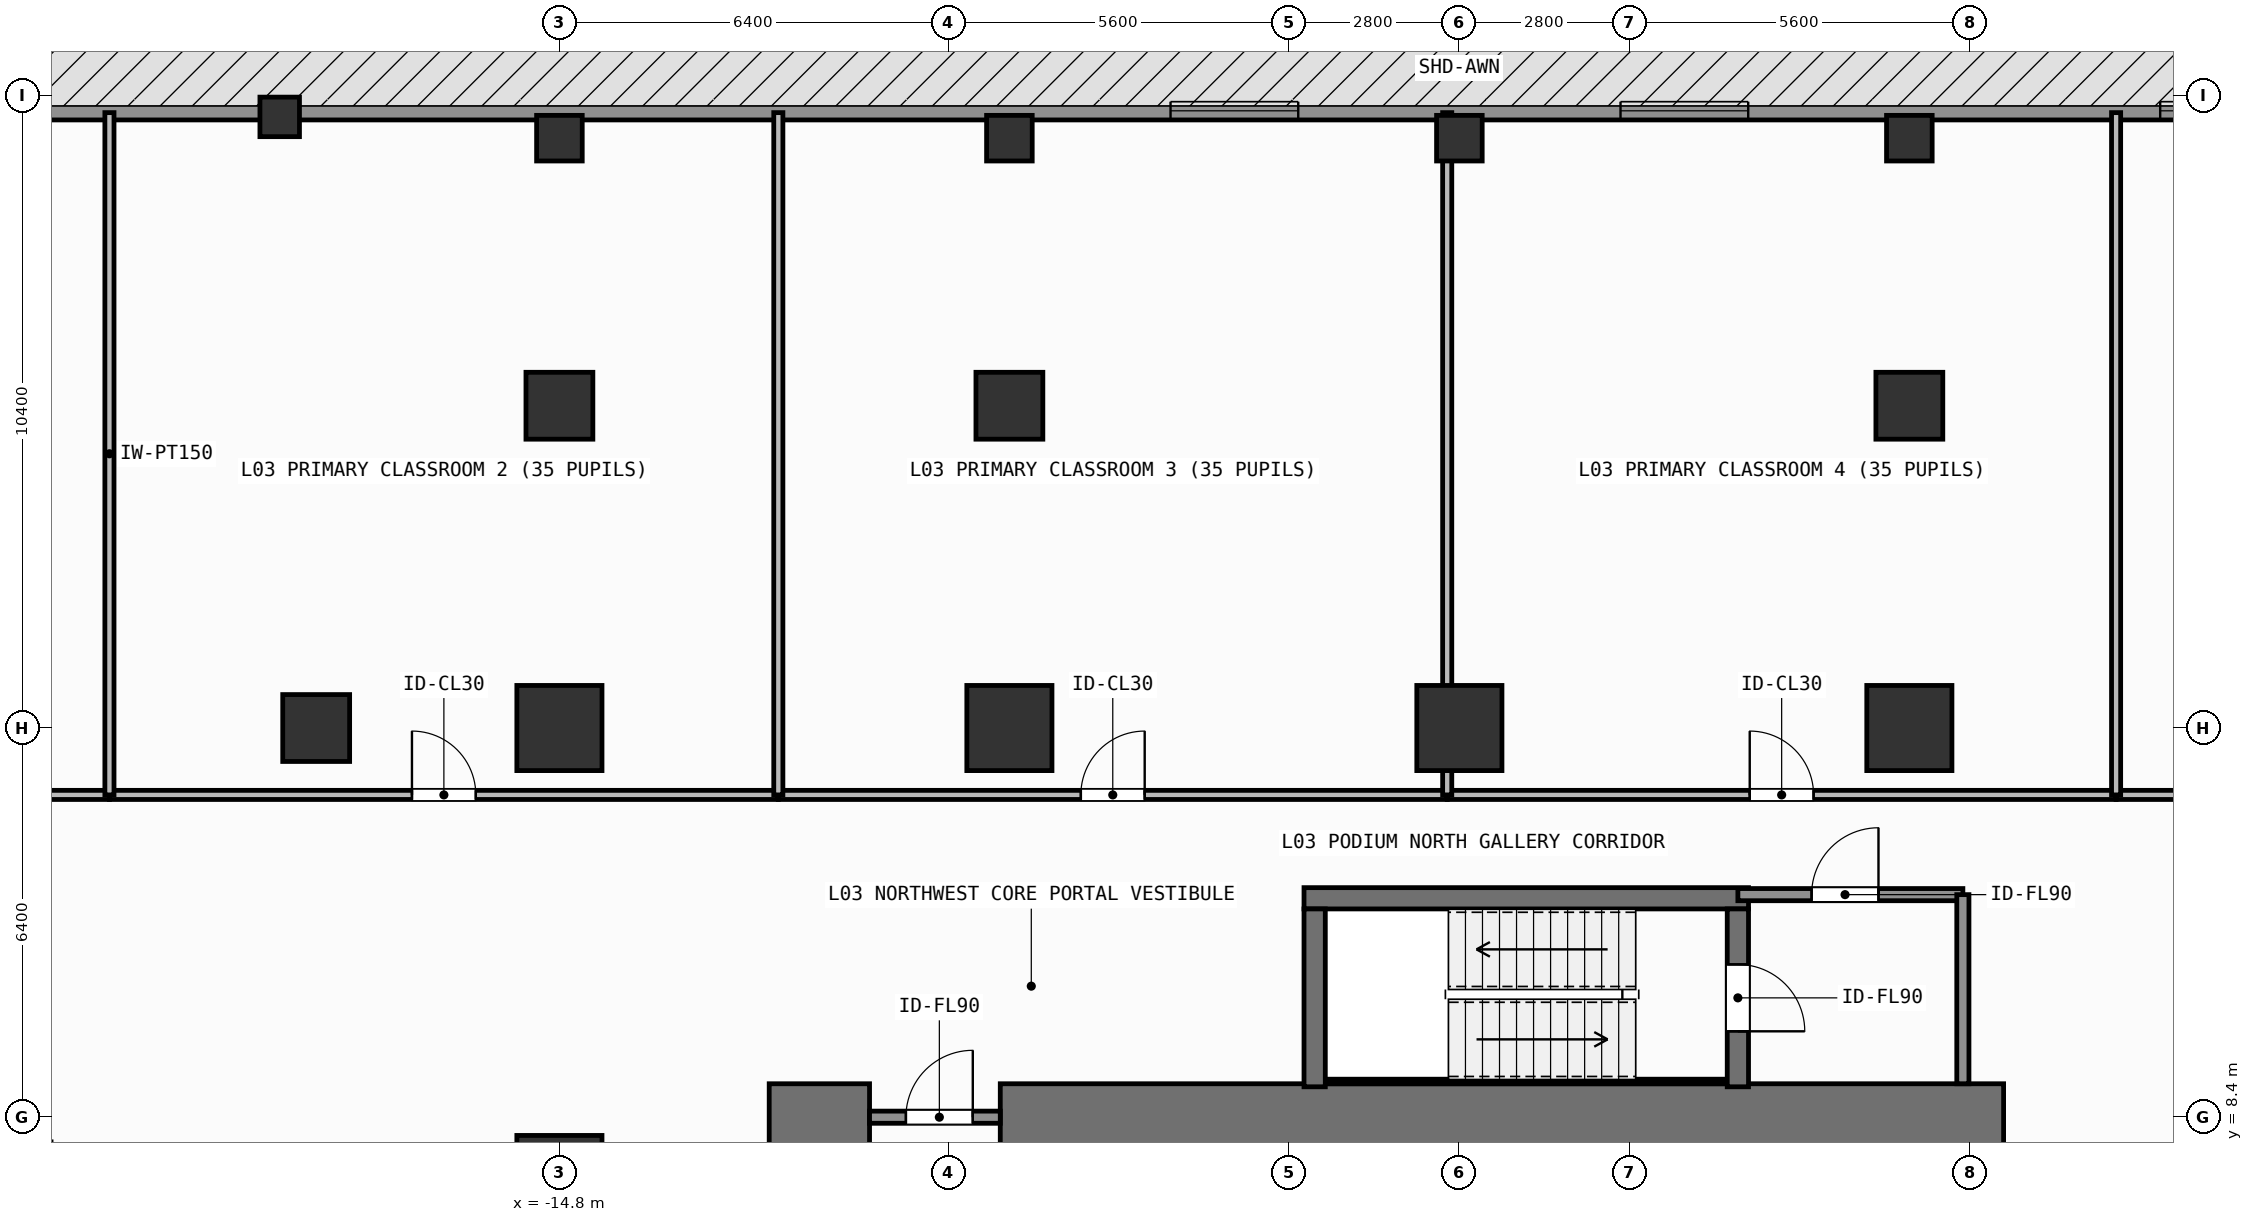
"""IFC4 building model, lengths in metres.
Left out: names, types, materials, properties, quantities, classifications, styles, units other than length and angle.
Written with IfcOpenShell. Run it as: python <this file> out.ifc"""

import sys

from ifc_helpers import new_model, si_unit, direction, frame, frame_2d, origin, origin_2d, place, context, subcontext, project, spatial, rectangle, extrude, element, fill, save


model = new_model("IFC4")
c1 = context("Model", 3, precision=1e-05, world=origin(), true_north=direction((0.0, 1.0)))
c2 = subcontext(c1, "Body", "Model", "MODEL_VIEW")
j1 = project(units=[si_unit("LENGTHUNIT", "METRE"), si_unit("PLANEANGLEUNIT", "RADIAN")], contexts=[c1])
p1 = place(None, origin())
s1 = spatial("IfcSite", under=j1, at=p1, CompositionType="ELEMENT")
p2 = place(p1, origin())
s2 = spatial("IfcBuilding", under=s1, at=p2, CompositionType="ELEMENT")
p3 = place(p2, frame((0.0, 0.0, 9.0)))
s3 = spatial("IfcBuildingStorey", under=s2, at=p3, CompositionType="ELEMENT", Elevation=9.0)
p4 = place(p3, frame((-11.35, 8.4, 0.0), z_axis=(0.0, 0.0, 1.0), x_axis=(1.0, 0.0, 0.0)))
e1 = element("IfcWall", 1, at=p4, inside=s3, PredefinedType="SHEAR", context=c2, shape_type="SweptSolid", body=[
    extrude(rectangle(XDim=1.65, YDim=1.1, at=frame_2d((0.825, 0.0))), origin(), (0.0, 0.0, 1.0), 4.2),
])
p5 = place(p3, frame((-7.55, 8.4, 0.0), z_axis=(0.0, 0.0, 1.0), x_axis=(1.0, 0.0, 0.0)))
e2 = element("IfcWall", 2, at=p5, inside=s3, PredefinedType="SHEAR", context=c2, shape_type="SweptSolid", body=[
    extrude(rectangle(XDim=16.5, YDim=1.1, at=frame_2d((8.25, 0.0))), origin(), (0.0, 0.0, 1.0), 4.2),
])
p6 = place(p3, frame((-2.555, 12.0, 0.0), z_axis=(0.0, 0.0, 1.0), x_axis=(1.0, 0.0, 0.0)))
e3 = element("IfcWall", 3, at=p6, inside=s3, PredefinedType="SHEAR", context=c2, shape_type="SweptSolid", body=[
    extrude(rectangle(XDim=7.31, YDim=0.35, at=frame_2d((3.655, 0.0))), origin(), (0.0, 0.0, 1.0), 4.2),
])
p7 = place(p3, frame((-2.2, 8.988, 0.0), z_axis=(0.0, 0.0, 1.0), x_axis=(1.0, 0.0, 0.0)))
e4 = element("IfcWall", 4, at=p7, inside=s3, PredefinedType="SHEAR", context=c2, shape_type="SweptSolid", body=[
    extrude(rectangle(XDim=6.6, YDim=0.075, at=frame_2d((3.3, 0.0))), origin(), (0.0, 0.0, 1.0), 4.2),
])
p8 = place(p3, frame((-2.38, 8.9, 0.0), z_axis=(0.0, 0.0, 1.0), x_axis=(0.0, 1.0, 0.0)))
e5 = element("IfcWall", 5, at=p8, inside=s3, PredefinedType="SHEAR", context=c2, shape_type="SweptSolid", body=[
    extrude(rectangle(XDim=2.925, YDim=0.35, at=frame_2d((1.462, 0.0))), origin(), (0.0, 0.0, 1.0), 4.2),
])
p9 = place(p3, frame((4.58, 11.825, 0.0), z_axis=(0.0, 0.0, 1.0), x_axis=(0.0, -1.0, 0.0)))
e6 = element("IfcWall", 6, at=p9, inside=s3, PredefinedType="SHEAR", context=c2, shape_type="SweptSolid", body=[
    extrude(rectangle(XDim=2.925, YDim=0.35, at=frame_2d((1.462, 0.0))), origin(), (0.0, 0.0, 1.0), 4.2),
])
p10 = place(p9, frame((0.913, 0.0, 0.0)))
e7 = element("IfcOpeningElement", 7, at=p10, cuts=e6, PredefinedType="OPENING", context=c2, shape_type="SweptSolid", body=[
    extrude(rectangle(XDim=1.1, YDim=2.15, at=frame_2d((0.55, 1.075))), frame((0.0, 0.185, 0.0), z_axis=(0.0, -1.0, 0.0), x_axis=(1.0, 0.0, 0.0)), (0.0, 0.0, 1.0), 0.37),
])
for number, where, z_axis, x_axis in (
    (8, (-14.8, 14.8, 0.0), (0.0, 0.0, 1.0), (1.0, 0.0, 0.0)),
    (9, (-7.4, 14.8, 0.0), (0.0, 0.0, 1.0), (1.0, 0.0, 0.0)),
    (10, (0.0, 14.8, 0.0), (0.0, 0.0, 1.0), (1.0, 0.0, 0.0)),
    (11, (7.4, 14.8, 0.0), (0.0, 0.0, 1.0), (1.0, 0.0, 0.0)),
    (12, (-14.8, 7.4, 0.0), (0.0, 0.0, 1.0), (1.0, 0.0, 0.0)),
):
    element("IfcColumn", number, at=place(p3, frame(where, z_axis=z_axis, x_axis=x_axis)), inside=s3, PredefinedType="COLUMN", context=c2, shape_type="SweptSolid", body=[
        extrude(rectangle(XDim=1.4, YDim=1.4, at=origin_2d()), origin(), (0.0, 0.0, 1.0), 4.2),
    ])
for number, where, z_axis, x_axis in (
    (13, (-18.8, 14.8, 0.0), (0.0, 0.0, 1.0), (1.0, 0.0, 0.0)),
    (14, (-14.8, 20.1, 0.0), (0.0, 0.0, 1.0), (1.0, 0.0, 0.0)),
    (15, (-7.4, 20.1, 0.0), (0.0, 0.0, 1.0), (1.0, 0.0, 0.0)),
    (16, (7.4, 20.1, 0.0), (0.0, 0.0, 1.0), (1.0, 0.0, 0.0)),
):
    element("IfcColumn", number, at=place(p3, frame(where, z_axis=z_axis, x_axis=x_axis)), inside=s3, PredefinedType="COLUMN", context=c2, shape_type="SweptSolid", body=[
        extrude(rectangle(XDim=1.1, YDim=1.1, at=origin_2d()), origin(), (0.0, 0.0, 1.0), 4.2),
    ])
for number, where, z_axis, x_axis in (
    (17, (-14.8, 24.5, 0.0), (0.0, 0.0, 1.0), (1.0, 0.0, 0.0)),
    (18, (-7.4, 24.5, 0.0), (0.0, 0.0, 1.0), (1.0, 0.0, 0.0)),
    (19, (0.0, 24.5, 0.0), (0.0, 0.0, 1.0), (1.0, 0.0, 0.0)),
    (20, (7.4, 24.5, 0.0), (0.0, 0.0, 1.0), (1.0, 0.0, 0.0)),
):
    element("IfcColumn", number, at=place(p3, frame(where, z_axis=z_axis, x_axis=x_axis)), inside=s3, PredefinedType="COLUMN", context=c2, shape_type="SweptSolid", body=[
        extrude(rectangle(XDim=0.75, YDim=0.75, at=origin_2d()), origin(), (0.0, 0.0, 1.0), 4.2),
    ])
p11 = place(p3, frame((-19.4, 24.85, 0.0), z_axis=(0.0, 0.0, 1.0), x_axis=(1.0, 0.0, 0.0)))
e21 = element("IfcColumn", 21, at=p11, inside=s3, PredefinedType="PILASTER", context=c2, shape_type="SweptSolid", body=[
    extrude(rectangle(XDim=0.65, YDim=0.65, at=origin_2d()), origin(), (0.0, 0.0, 1.0), 4.2),
])
p12 = place(p3, frame((-29.1, 24.95, 0.0), z_axis=(0.0, 0.0, 1.0), x_axis=(1.0, 0.0, 0.0)))
e22 = element("IfcWall", 22, at=p12, inside=s3, PredefinedType="SOLIDWALL", context=c2, shape_type="SweptSolid", body=[
    extrude(rectangle(XDim=58.2, YDim=0.3, at=frame_2d((29.1, 0.0))), origin(), (0.0, 0.0, 1.0), 3.96),
])
p13 = place(p12, frame((24.35, 0.0, 0.85)))
e23 = element("IfcOpeningElement", 23, at=p13, cuts=e22, PredefinedType="OPENING", context=c2, shape_type="SweptSolid", body=[
    extrude(rectangle(XDim=2.1, YDim=2.2, at=frame_2d((1.05, 1.1))), frame((0.0, 0.16, 0.0), z_axis=(0.0, -1.0, 0.0), x_axis=(1.0, 0.0, 0.0)), (0.0, 0.0, 1.0), 0.32),
])
p14 = place(p12, frame((31.75, 0.0, 0.85)))
e24 = element("IfcOpeningElement", 24, at=p14, cuts=e22, PredefinedType="OPENING", context=c2, shape_type="SweptSolid", body=[
    extrude(rectangle(XDim=2.1, YDim=2.2, at=frame_2d((1.05, 1.1))), frame((0.0, 0.16, 0.0), z_axis=(0.0, -1.0, 0.0), x_axis=(1.0, 0.0, 0.0)), (0.0, 0.0, 1.0), 0.32),
])
p15 = place(p12, frame((40.625, 0.0, 0.85)))
e25 = element("IfcOpeningElement", 25, at=p15, cuts=e22, PredefinedType="OPENING", context=c2, shape_type="SweptSolid", body=[
    extrude(rectangle(XDim=2.1, YDim=2.2, at=frame_2d((1.05, 1.1))), frame((0.0, 0.16, 0.0), z_axis=(0.0, -1.0, 0.0), x_axis=(1.0, 0.0, 0.0)), (0.0, 0.0, 1.0), 0.32),
])
p16 = place(p12, frame((45.175, 0.0, 0.85)))
e26 = element("IfcOpeningElement", 26, at=p16, cuts=e22, PredefinedType="OPENING", context=c2, shape_type="SweptSolid", body=[
    extrude(rectangle(XDim=2.1, YDim=2.2, at=frame_2d((1.05, 1.1))), frame((0.0, 0.16, 0.0), z_axis=(0.0, -1.0, 0.0), x_axis=(1.0, 0.0, 0.0)), (0.0, 0.0, 1.0), 0.32),
])
p17 = place(p3, frame((4.58, 12.06, 0.0), z_axis=(0.0, 0.0, 1.0), x_axis=(1.0, 0.0, 0.0)))
e27 = element("IfcWall", 27, at=p17, inside=s3, PredefinedType="SOLIDWALL", context=c2, shape_type="SweptSolid", body=[
    extrude(rectangle(XDim=3.7, YDim=0.2, at=frame_2d((1.85, 0.0))), origin(), (0.0, 0.0, 1.0), 3.96),
])
p18 = place(p17, frame((1.212, 0.0, 0.0)))
e28 = element("IfcOpeningElement", 28, at=p18, cuts=e27, PredefinedType="OPENING", context=c2, shape_type="SweptSolid", body=[
    extrude(rectangle(XDim=1.1, YDim=2.15, at=frame_2d((0.55, 1.075))), frame((0.0, 0.11, 0.0), z_axis=(0.0, -1.0, 0.0), x_axis=(1.0, 0.0, 0.0)), (0.0, 0.0, 1.0), 0.22),
])
p19 = place(p3, frame((-9.7, 8.4, 0.0), z_axis=(0.0, 0.0, 1.0), x_axis=(1.0, 0.0, 0.0)))
e29 = element("IfcWall", 29, at=p19, inside=s3, PredefinedType="SOLIDWALL", context=c2, shape_type="SweptSolid", body=[
    extrude(rectangle(XDim=2.15, YDim=0.2, at=frame_2d((1.075, 0.0))), origin(), (0.0, 0.0, 1.0), 3.0),
])
p20 = place(p19, frame((0.598, 0.0, 0.0)))
e30 = element("IfcOpeningElement", 30, at=p20, cuts=e29, PredefinedType="OPENING", context=c2, shape_type="SweptSolid", body=[
    extrude(rectangle(XDim=1.1, YDim=2.15, at=frame_2d((0.55, 1.075))), frame((0.0, 0.11, 0.0), z_axis=(0.0, -1.0, 0.0), x_axis=(1.0, 0.0, 0.0)), (0.0, 0.0, 1.0), 0.22),
])
p21 = place(p3, frame((-33.42, 13.7, 0.0), z_axis=(0.0, 0.0, 1.0), x_axis=(1.0, 0.0, 0.0)))
e31 = element("IfcWall", 31, at=p21, inside=s3, PredefinedType="PARTITIONING", context=c2, shape_type="SweptSolid", body=[
    extrude(rectangle(XDim=11.22, YDim=0.15, at=frame_2d((5.61, 0.0))), origin(), (0.0, 0.0, 1.0), 3.96),
])
p22 = place(p21, frame((5.175, 0.0, 0.0)))
e32 = element("IfcOpeningElement", 32, at=p22, cuts=e31, PredefinedType="OPENING", context=c2, shape_type="SweptSolid", body=[
    extrude(rectangle(XDim=1.05, YDim=2.2, at=frame_2d((0.525, 1.1))), frame((0.0, 0.085, 0.0), z_axis=(0.0, -1.0, 0.0), x_axis=(1.0, 0.0, 0.0)), (0.0, 0.0, 1.0), 0.17),
])
p23 = place(p3, frame((-22.2, 13.7, 0.0), z_axis=(0.0, 0.0, 1.0), x_axis=(1.0, 0.0, 0.0)))
e33 = element("IfcWall", 33, at=p23, inside=s3, PredefinedType="PARTITIONING", context=c2, shape_type="SweptSolid", body=[
    extrude(rectangle(XDim=11.0, YDim=0.15, at=frame_2d((5.5, 0.0))), origin(), (0.0, 0.0, 1.0), 3.96),
])
p24 = place(p23, frame((4.975, 0.0, 0.0)))
e34 = element("IfcOpeningElement", 34, at=p24, cuts=e33, PredefinedType="OPENING", context=c2, shape_type="SweptSolid", body=[
    extrude(rectangle(XDim=1.05, YDim=2.2, at=frame_2d((0.525, 1.1))), frame((0.0, 0.085, 0.0), z_axis=(0.0, -1.0, 0.0), x_axis=(1.0, 0.0, 0.0)), (0.0, 0.0, 1.0), 0.17),
])
p25 = place(p3, frame((-11.2, 13.7, 0.0), z_axis=(0.0, 0.0, 1.0), x_axis=(1.0, 0.0, 0.0)))
e35 = element("IfcWall", 35, at=p25, inside=s3, PredefinedType="PARTITIONING", context=c2, shape_type="SweptSolid", body=[
    extrude(rectangle(XDim=11.0, YDim=0.15, at=frame_2d((5.5, 0.0))), origin(), (0.0, 0.0, 1.0), 3.96),
])
p26 = place(p25, frame((4.975, 0.0, 0.0)))
e36 = element("IfcOpeningElement", 36, at=p26, cuts=e35, PredefinedType="OPENING", context=c2, shape_type="SweptSolid", body=[
    extrude(rectangle(XDim=1.05, YDim=2.2, at=frame_2d((0.525, 1.1))), frame((0.0, 0.085, 0.0), z_axis=(0.0, -1.0, 0.0), x_axis=(1.0, 0.0, 0.0)), (0.0, 0.0, 1.0), 0.17),
])
p27 = place(p3, frame((-0.2, 13.7, 0.0), z_axis=(0.0, 0.0, 1.0), x_axis=(1.0, 0.0, 0.0)))
e37 = element("IfcWall", 37, at=p27, inside=s3, PredefinedType="PARTITIONING", context=c2, shape_type="SweptSolid", body=[
    extrude(rectangle(XDim=11.0, YDim=0.15, at=frame_2d((5.5, 0.0))), origin(), (0.0, 0.0, 1.0), 3.96),
])
p28 = place(p27, frame((4.975, 0.0, 0.0)))
e38 = element("IfcOpeningElement", 38, at=p28, cuts=e37, PredefinedType="OPENING", context=c2, shape_type="SweptSolid", body=[
    extrude(rectangle(XDim=1.05, YDim=2.2, at=frame_2d((0.525, 1.1))), frame((0.0, 0.085, 0.0), z_axis=(0.0, -1.0, 0.0), x_axis=(1.0, 0.0, 0.0)), (0.0, 0.0, 1.0), 0.17),
])
p29 = place(p3, frame((10.8, 13.7, 0.0), z_axis=(0.0, 0.0, 1.0), x_axis=(1.0, 0.0, 0.0)))
e39 = element("IfcWall", 39, at=p29, inside=s3, PredefinedType="PARTITIONING", context=c2, shape_type="SweptSolid", body=[
    extrude(rectangle(XDim=11.2, YDim=0.15, at=frame_2d((5.6, 0.0))), origin(), (0.0, 0.0, 1.0), 3.96),
])
p30 = place(p29, frame((4.986, 0.0, 0.0)))
e40 = element("IfcOpeningElement", 40, at=p30, cuts=e39, PredefinedType="OPENING", context=c2, shape_type="SweptSolid", body=[
    extrude(rectangle(XDim=1.05, YDim=2.2, at=frame_2d((0.525, 1.1))), frame((0.0, 0.085, 0.0), z_axis=(0.0, -1.0, 0.0), x_axis=(1.0, 0.0, 0.0)), (0.0, 0.0, 1.0), 0.17),
])
p31 = place(p3, frame((8.28, 8.95, 0.0), z_axis=(0.0, 0.0, 1.0), x_axis=(0.0, 1.0, 0.0)))
e41 = element("IfcWall", 41, at=p31, inside=s3, PredefinedType="SOLIDWALL", context=c2, shape_type="SweptSolid", body=[
    extrude(rectangle(XDim=3.11, YDim=0.2, at=frame_2d((1.555, 0.0))), origin(), (0.0, 0.0, 1.0), 3.96),
])
for number, where, z_axis, x_axis in (
    (42, (-22.2, 13.7, 0.0), (0.0, 0.0, 1.0), (0.0, 1.0, 0.0)),
    (43, (-11.2, 13.7, 0.0), (0.0, 0.0, 1.0), (0.0, 1.0, 0.0)),
):
    element("IfcWall", number, at=place(p3, frame(where, z_axis=z_axis, x_axis=x_axis)), inside=s3, PredefinedType="PARTITIONING", context=c2, shape_type="SweptSolid", body=[
        extrude(rectangle(XDim=11.22, YDim=0.15, at=frame_2d((5.61, 0.0))), origin(), (0.0, 0.0, 1.0), 3.96),
    ])
p32 = place(p3, frame((-0.2, 13.7, 0.0), z_axis=(0.0, 0.0, 1.0), x_axis=(0.0, 1.0, 0.0)))
e44 = element("IfcWall", 44, at=p32, inside=s3, PredefinedType="PARTITIONING", context=c2, shape_type="SweptSolid", body=[
    extrude(rectangle(XDim=11.22, YDim=0.15, at=frame_2d((5.61, 0.0))), origin(), (0.0, 0.0, 1.0), 3.05),
])
p33 = place(p3, frame((10.8, 13.7, 0.0), z_axis=(0.0, 0.0, 1.0), x_axis=(0.0, 1.0, 0.0)))
e45 = element("IfcWall", 45, at=p33, inside=s3, PredefinedType="PARTITIONING", context=c2, shape_type="SweptSolid", body=[
    extrude(rectangle(XDim=11.22, YDim=0.15, at=frame_2d((5.61, 0.0))), origin(), (0.0, 0.0, 1.0), 3.96),
])
p34 = place(p13, origin())
e46 = element("IfcWindow", 46, at=p34, inside=s3, PartitioningType="SINGLE_PANEL", PredefinedType="WINDOW", context=c2, shape_type="SweptSolid", body=[
    extrude(rectangle(XDim=2.1, YDim=2.2, at=frame_2d((1.05, 1.1))), frame((0.0, 0.03, 0.0), z_axis=(0.0, -1.0, 0.0), x_axis=(1.0, 0.0, 0.0)), (0.0, 0.0, 1.0), 0.06),
])
fill(e23, e46)
p35 = place(p14, origin())
e47 = element("IfcWindow", 47, at=p35, inside=s3, PartitioningType="SINGLE_PANEL", PredefinedType="WINDOW", context=c2, shape_type="SweptSolid", body=[
    extrude(rectangle(XDim=2.1, YDim=2.2, at=frame_2d((1.05, 1.1))), frame((0.0, 0.03, 0.0), z_axis=(0.0, -1.0, 0.0), x_axis=(1.0, 0.0, 0.0)), (0.0, 0.0, 1.0), 0.06),
])
fill(e24, e47)
p36 = place(p15, origin())
e48 = element("IfcWindow", 48, at=p36, inside=s3, PartitioningType="SINGLE_PANEL", PredefinedType="WINDOW", context=c2, shape_type="SweptSolid", body=[
    extrude(rectangle(XDim=2.1, YDim=2.2, at=frame_2d((1.05, 1.1))), frame((0.0, 0.03, 0.0), z_axis=(0.0, -1.0, 0.0), x_axis=(1.0, 0.0, 0.0)), (0.0, 0.0, 1.0), 0.06),
])
fill(e25, e48)
p37 = place(p10, origin())
e49 = element("IfcDoor", 49, at=p37, inside=s3, OperationType="SINGLE_SWING_RIGHT", PredefinedType="DOOR", context=c2, shape_type="SweptSolid", body=[
    extrude(rectangle(XDim=1.1, YDim=2.15, at=frame_2d((0.55, 1.075))), frame((0.0, 0.025, 0.0), z_axis=(0.0, -1.0, 0.0), x_axis=(1.0, 0.0, 0.0)), (0.0, 0.0, 1.0), 0.05),
])
fill(e7, e49)
p38 = place(p18, origin())
e50 = element("IfcDoor", 50, at=p38, inside=s3, OperationType="SINGLE_SWING_RIGHT", PredefinedType="DOOR", context=c2, shape_type="SweptSolid", body=[
    extrude(rectangle(XDim=1.1, YDim=2.15, at=frame_2d((0.55, 1.075))), frame((0.0, 0.025, 0.0), z_axis=(0.0, -1.0, 0.0), x_axis=(1.0, 0.0, 0.0)), (0.0, 0.0, 1.0), 0.05),
])
fill(e28, e50)
p39 = place(p20, origin())
e51 = element("IfcDoor", 51, at=p39, inside=s3, OperationType="SINGLE_SWING_RIGHT", PredefinedType="DOOR", context=c2, shape_type="SweptSolid", body=[
    extrude(rectangle(XDim=1.1, YDim=2.15, at=frame_2d((0.55, 1.075))), frame((0.0, 0.025, 0.0), z_axis=(0.0, -1.0, 0.0), x_axis=(1.0, 0.0, 0.0)), (0.0, 0.0, 1.0), 0.05),
])
fill(e30, e51)
p40 = place(p24, origin())
e52 = element("IfcDoor", 52, at=p40, inside=s3, OperationType="SINGLE_SWING_LEFT", PredefinedType="DOOR", context=c2, shape_type="SweptSolid", body=[
    extrude(rectangle(XDim=1.05, YDim=2.2, at=frame_2d((0.525, 1.1))), frame((0.0, 0.025, 0.0), z_axis=(0.0, -1.0, 0.0), x_axis=(1.0, 0.0, 0.0)), (0.0, 0.0, 1.0), 0.05),
])
fill(e34, e52)
p41 = place(p26, origin())
e53 = element("IfcDoor", 53, at=p41, inside=s3, OperationType="SINGLE_SWING_RIGHT", PredefinedType="DOOR", context=c2, shape_type="SweptSolid", body=[
    extrude(rectangle(XDim=1.05, YDim=2.2, at=frame_2d((0.525, 1.1))), frame((0.0, 0.025, 0.0), z_axis=(0.0, -1.0, 0.0), x_axis=(1.0, 0.0, 0.0)), (0.0, 0.0, 1.0), 0.05),
])
fill(e36, e53)
p42 = place(p28, origin())
e54 = element("IfcDoor", 54, at=p42, inside=s3, OperationType="SINGLE_SWING_LEFT", PredefinedType="DOOR", context=c2, shape_type="SweptSolid", body=[
    extrude(rectangle(XDim=1.05, YDim=2.2, at=frame_2d((0.525, 1.1))), frame((0.0, 0.025, 0.0), z_axis=(0.0, -1.0, 0.0), x_axis=(1.0, 0.0, 0.0)), (0.0, 0.0, 1.0), 0.05),
])
fill(e38, e54)
save(model, sys.argv[1])
